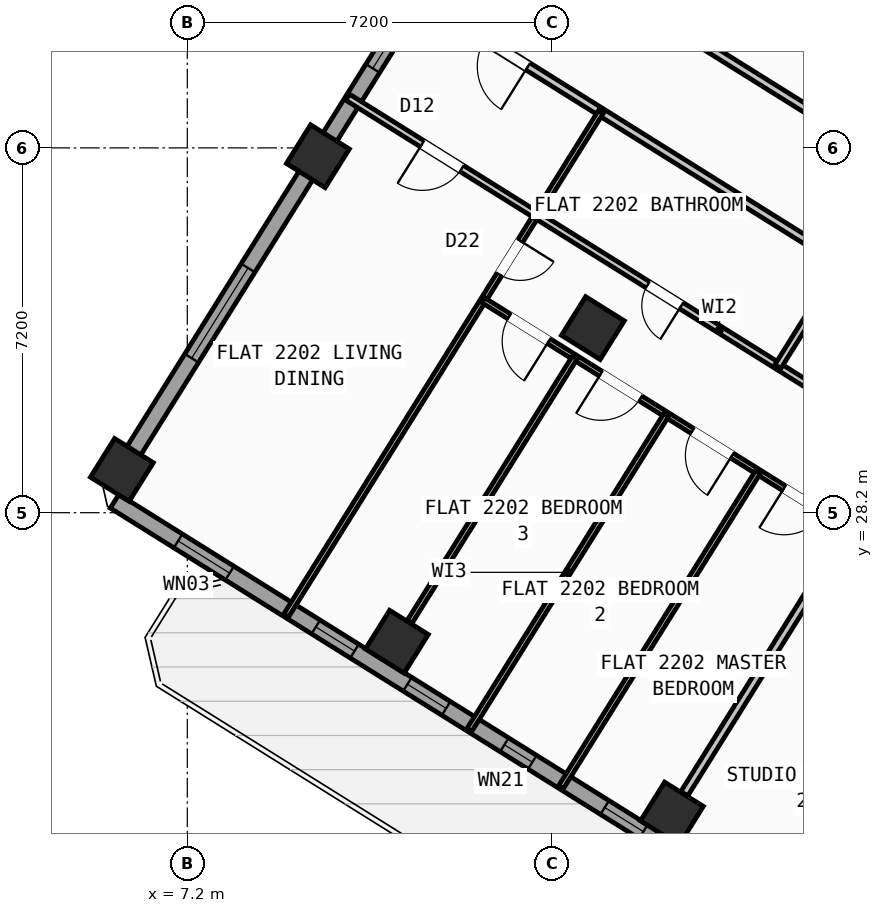
"""IFC4 building model, lengths in metres.
Left out: names, types, materials, properties, quantities, classifications, styles, units other than length and angle.
Written with IfcOpenShell. Run it as: python <this file> out.ifc"""

import sys

from ifc_helpers import new_model, si_unit, direction, frame, frame_2d, origin, origin_2d, place, context, subcontext, project, spatial, rectangle, hollow_rectangle, extrude, source, transform, mapped, element, fill, save


model = new_model("IFC4")
c1 = context("Model", 3, precision=1e-05, world=origin(), true_north=direction((0.0, 1.0)))
c2 = subcontext(c1, "Body", "Model", "MODEL_VIEW")
j1 = project(units=[si_unit("LENGTHUNIT", "METRE"), si_unit("PLANEANGLEUNIT", "RADIAN")], contexts=[c1])
p1 = place(None, origin())
s1 = spatial("IfcSite", under=j1, at=p1, CompositionType="ELEMENT")
p2 = place(p1, origin())
s2 = spatial("IfcBuilding", under=s1, at=p2, CompositionType="ELEMENT")
p3 = place(p2, frame((0.0, 0.0, 90.0)))
s3 = spatial("IfcBuildingStorey", under=s2, at=p3, CompositionType="ELEMENT", Elevation=90.0)
m1 = source(origin(), c2, "Body", "SweptSolid", [
    extrude(hollow_rectangle(XDim=0.9, YDim=0.9, WallThickness=0.036, at=origin_2d()), origin(), (0.0, 0.0, 1.0), 3.6),
])
for number, where, z_axis, x_axis in (
    (1, (16.764, 22.261, 0.0), (0.0, 0.0, 1.0), (-0.848, 0.53, 0.0)),
    (2, (15.205, 31.844, 0.0), (0.0, 0.0, 1.0), (-0.848, 0.53, 0.0)),
    (3, (11.336, 25.653, 0.0), (0.0, 0.0, 1.0), (-0.848, 0.53, 0.0)),
    (4, (9.777, 35.235, 0.0), (0.0, 0.0, 1.0), (-0.848, 0.53, 0.0)),
    (5, (5.909, 29.044, 0.0), (0.0, 0.0, 1.0), (-0.848, 0.53, 0.0)),
):
    element("IfcColumn", number, at=place(p3, frame(where, z_axis=z_axis, x_axis=x_axis)), inside=s3, PredefinedType="COLUMN", context=c2, shape_type="MappedRepresentation", body=[
        mapped(m1, transform((0.0, 0.0, 0.0), scale=1.0)),
    ])
p4 = place(p3, frame((31.76, 12.183, 0.0), z_axis=(0.0, 0.0, 1.0), x_axis=(-0.848047074256, 0.529920899612, 0.0)))
e6 = element("IfcWall", 6, at=p4, inside=s3, PredefinedType="STANDARD", context=c2, shape_type="SweptSolid", body=[
    extrude(rectangle(XDim=30.652, YDim=0.32, at=frame_2d((15.326, 0.0))), origin(), (0.0, 0.0, 1.0), 3.35),
])
p5 = place(p4, frame((15.153, 0.0, 0.0)))
e7 = element("IfcOpeningElement", 7, at=p5, cuts=e6, PredefinedType="OPENING", context=c2, shape_type="SweptSolid", body=[
    extrude(rectangle(XDim=1.2, YDim=2.15, at=frame_2d((0.6, 1.075))), frame((0.0, 0.17, 0.0), z_axis=(0.0, -1.0, 0.0), x_axis=(1.0, 0.0, 0.0)), (0.0, 0.0, 1.0), 0.34),
])
p6 = place(p4, frame((2.002, 0.0, 0.8)))
e8 = element("IfcOpeningElement", 8, at=p6, cuts=e6, PredefinedType="OPENING", context=c2, shape_type="SweptSolid", body=[
    extrude(rectangle(XDim=2.1, YDim=1.55, at=frame_2d((1.05, 0.775))), frame((0.0, 0.17, 0.0), z_axis=(0.0, -1.0, 0.0), x_axis=(1.0, 0.0, 0.0)), (0.0, 0.0, 1.0), 0.34),
])
p7 = place(p4, frame((7.206, 0.0, 0.8)))
e9 = element("IfcOpeningElement", 9, at=p7, cuts=e6, PredefinedType="OPENING", context=c2, shape_type="SweptSolid", body=[
    extrude(rectangle(XDim=2.1, YDim=1.55, at=frame_2d((1.05, 0.775))), frame((0.0, 0.17, 0.0), z_axis=(0.0, -1.0, 0.0), x_axis=(1.0, 0.0, 0.0)), (0.0, 0.0, 1.0), 0.34),
])
p8 = place(p4, frame((12.648, 0.0, 1.0)))
e10 = element("IfcOpeningElement", 10, at=p8, cuts=e6, PredefinedType="OPENING", context=c2, shape_type="SweptSolid", body=[
    extrude(rectangle(XDim=0.9, YDim=1.25, at=frame_2d((0.45, 0.625))), frame((0.0, 0.17, 0.0), z_axis=(0.0, -1.0, 0.0), x_axis=(1.0, 0.0, 0.0)), (0.0, 0.0, 1.0), 0.34),
])
p9 = place(p4, frame((27.974, 0.0, 0.95)))
e11 = element("IfcOpeningElement", 11, at=p9, cuts=e6, PredefinedType="OPENING", context=c2, shape_type="SweptSolid", body=[
    extrude(rectangle(XDim=1.2, YDim=1.4, at=frame_2d((0.6, 0.7))), frame((0.0, 0.17, 0.0), z_axis=(0.0, -1.0, 0.0), x_axis=(1.0, 0.0, 0.0)), (0.0, 0.0, 1.0), 0.34),
])
p10 = place(p4, frame((18.347, 0.0, 1.0)))
e12 = element("IfcOpeningElement", 12, at=p10, cuts=e6, PredefinedType="OPENING", context=c2, shape_type="SweptSolid", body=[
    extrude(rectangle(XDim=0.9, YDim=1.25, at=frame_2d((0.45, 0.625))), frame((0.0, 0.17, 0.0), z_axis=(0.0, -1.0, 0.0), x_axis=(1.0, 0.0, 0.0)), (0.0, 0.0, 1.0), 0.34),
])
p11 = place(p4, frame((20.931, 0.0, 1.0)))
e13 = element("IfcOpeningElement", 13, at=p11, cuts=e6, PredefinedType="OPENING", context=c2, shape_type="SweptSolid", body=[
    extrude(rectangle(XDim=0.65, YDim=1.15, at=frame_2d((0.325, 0.575))), frame((0.0, 0.17, 0.0), z_axis=(0.0, -1.0, 0.0), x_axis=(1.0, 0.0, 0.0)), (0.0, 0.0, 1.0), 0.34),
])
p12 = place(p4, frame((22.938, 0.0, 1.0)))
e14 = element("IfcOpeningElement", 14, at=p12, cuts=e6, PredefinedType="OPENING", context=c2, shape_type="SweptSolid", body=[
    extrude(rectangle(XDim=0.9, YDim=1.25, at=frame_2d((0.45, 0.625))), frame((0.0, 0.17, 0.0), z_axis=(0.0, -1.0, 0.0), x_axis=(1.0, 0.0, 0.0)), (0.0, 0.0, 1.0), 0.34),
])
p13 = place(p4, frame((25.069, 0.0, 1.0)))
e15 = element("IfcOpeningElement", 15, at=p13, cuts=e6, PredefinedType="OPENING", context=c2, shape_type="SweptSolid", body=[
    extrude(rectangle(XDim=0.9, YDim=1.25, at=frame_2d((0.45, 0.625))), frame((0.0, 0.17, 0.0), z_axis=(0.0, -1.0, 0.0), x_axis=(1.0, 0.0, 0.0)), (0.0, 0.0, 1.0), 0.34),
])
p14 = place(p3, frame((5.7, 28.71, 0.0), z_axis=(0.0, 0.0, 1.0), x_axis=(0.529923711467, 0.8480453172, 0.0)))
e16 = element("IfcWall", 16, at=p14, inside=s3, PredefinedType="STANDARD", context=c2, shape_type="SweptSolid", body=[
    extrude(rectangle(XDim=21.587, YDim=0.32, at=frame_2d((10.794, 0.0))), origin(), (0.0, 0.0, 1.0), 2.775),
])
p15 = place(p14, frame((2.994, 0.0, 0.8)))
e17 = element("IfcOpeningElement", 17, at=p15, cuts=e16, PredefinedType="OPENING", context=c2, shape_type="SweptSolid", body=[
    extrude(rectangle(XDim=2.1, YDim=1.55, at=frame_2d((1.05, 0.775))), frame((0.0, 0.17, 0.0), z_axis=(0.0, -1.0, 0.0), x_axis=(1.0, 0.0, 0.0)), (0.0, 0.0, 1.0), 0.34),
])
p16 = place(p14, frame((9.739, 0.0, 1.0)))
e18 = element("IfcOpeningElement", 18, at=p16, cuts=e16, PredefinedType="OPENING", context=c2, shape_type="SweptSolid", body=[
    extrude(rectangle(XDim=0.9, YDim=1.25, at=frame_2d((0.45, 0.625))), frame((0.0, 0.17, 0.0), z_axis=(0.0, -1.0, 0.0), x_axis=(1.0, 0.0, 0.0)), (0.0, 0.0, 1.0), 0.34),
])
p17 = place(p14, frame((18.476, 0.0, 1.0)))
e19 = element("IfcOpeningElement", 19, at=p17, cuts=e16, PredefinedType="OPENING", context=c2, shape_type="SweptSolid", body=[
    extrude(rectangle(XDim=0.9, YDim=1.25, at=frame_2d((0.45, 0.625))), frame((0.0, 0.17, 0.0), z_axis=(0.0, -1.0, 0.0), x_axis=(1.0, 0.0, 0.0)), (0.0, 0.0, 1.0), 0.34),
])
p18 = place(p3, frame((17.424, 47.083, 0.0), z_axis=(0.0, 0.0, 1.0), x_axis=(0.848049927979, -0.529916332693, 0.0)))
e20 = element("IfcWall", 20, at=p18, inside=s3, PredefinedType="STANDARD", context=c2, shape_type="SweptSolid", body=[
    extrude(rectangle(XDim=29.223, YDim=0.32, at=frame_2d((14.612, 0.0))), origin(), (0.0, 0.0, 1.0), 3.35),
])
p19 = place(p18, frame((15.02, 0.0, 0.0)))
e21 = element("IfcOpeningElement", 21, at=p19, cuts=e20, PredefinedType="OPENING", context=c2, shape_type="SweptSolid", body=[
    extrude(rectangle(XDim=1.05, YDim=2.15, at=frame_2d((0.525, 1.075))), frame((0.0, 0.17, 0.0), z_axis=(0.0, -1.0, 0.0), x_axis=(1.0, 0.0, 0.0)), (0.0, 0.0, 1.0), 0.34),
])
p20 = place(p18, frame((20.869, 0.0, 0.8)))
e22 = element("IfcOpeningElement", 22, at=p20, cuts=e20, PredefinedType="OPENING", context=c2, shape_type="SweptSolid", body=[
    extrude(rectangle(XDim=2.1, YDim=1.55, at=frame_2d((1.05, 0.775))), frame((0.0, 0.17, 0.0), z_axis=(0.0, -1.0, 0.0), x_axis=(1.0, 0.0, 0.0)), (0.0, 0.0, 1.0), 0.34),
])
p21 = place(p18, frame((25.438, 0.0, 0.8)))
e23 = element("IfcOpeningElement", 23, at=p21, cuts=e20, PredefinedType="OPENING", context=c2, shape_type="SweptSolid", body=[
    extrude(rectangle(XDim=2.1, YDim=1.55, at=frame_2d((1.05, 0.775))), frame((0.0, 0.17, 0.0), z_axis=(0.0, -1.0, 0.0), x_axis=(1.0, 0.0, 0.0)), (0.0, 0.0, 1.0), 0.34),
])
p22 = place(p18, frame((10.481, 0.0, 1.0)))
e24 = element("IfcOpeningElement", 24, at=p22, cuts=e20, PredefinedType="OPENING", context=c2, shape_type="SweptSolid", body=[
    extrude(rectangle(XDim=0.9, YDim=1.25, at=frame_2d((0.45, 0.625))), frame((0.0, 0.17, 0.0), z_axis=(0.0, -1.0, 0.0), x_axis=(1.0, 0.0, 0.0)), (0.0, 0.0, 1.0), 0.34),
])
p23 = place(p18, frame((6.674, 0.0, 1.0)))
e25 = element("IfcOpeningElement", 25, at=p23, cuts=e20, PredefinedType="OPENING", context=c2, shape_type="SweptSolid", body=[
    extrude(rectangle(XDim=0.9, YDim=1.25, at=frame_2d((0.45, 0.625))), frame((0.0, 0.17, 0.0), z_axis=(0.0, -1.0, 0.0), x_axis=(1.0, 0.0, 0.0)), (0.0, 0.0, 1.0), 0.34),
])
p24 = place(p18, frame((3.694, 0.0, 1.0)))
e26 = element("IfcOpeningElement", 26, at=p24, cuts=e20, PredefinedType="OPENING", context=c2, shape_type="SweptSolid", body=[
    extrude(rectangle(XDim=0.9, YDim=1.25, at=frame_2d((0.45, 0.625))), frame((0.0, 0.17, 0.0), z_axis=(0.0, -1.0, 0.0), x_axis=(1.0, 0.0, 0.0)), (0.0, 0.0, 1.0), 0.34),
])
p25 = place(p3, frame((26.973, 31.447, 0.0), z_axis=(0.0, 0.0, 1.0), x_axis=(-0.848048310262, 0.529918921593, 0.0)))
e27 = element("IfcWall", 27, at=p25, inside=s3, PredefinedType="PARTITIONING", context=c2, shape_type="SweptSolid", body=[
    extrude(rectangle(XDim=16.73, YDim=0.16, at=frame_2d((8.365, 0.0))), origin(), (0.0, 0.0, 1.0), 3.34),
])
p26 = place(p25, frame((2.22, 0.0, 0.0)))
e28 = element("IfcOpeningElement", 28, at=p26, cuts=e27, PredefinedType="OPENING", context=c2, shape_type="SweptSolid", body=[
    extrude(rectangle(XDim=0.86, YDim=2.05, at=frame_2d((0.43, 1.025))), frame((0.0, 0.09, 0.0), z_axis=(0.0, -1.0, 0.0), x_axis=(1.0, 0.0, 0.0)), (0.0, 0.0, 1.0), 0.18),
])
p27 = place(p25, frame((5.28, 0.0, 0.0)))
e29 = element("IfcOpeningElement", 29, at=p27, cuts=e27, PredefinedType="OPENING", context=c2, shape_type="SweptSolid", body=[
    extrude(rectangle(XDim=1.0, YDim=2.1, at=frame_2d((0.5, 1.05))), frame((0.0, 0.09, 0.0), z_axis=(0.0, -1.0, 0.0), x_axis=(1.0, 0.0, 0.0)), (0.0, 0.0, 1.0), 0.18),
])
p28 = place(p3, frame((25.807, 29.582, 0.0), z_axis=(0.0, 0.0, 1.0), x_axis=(-0.848052408131, 0.529912363569, 0.0)))
e30 = element("IfcWall", 30, at=p28, inside=s3, PredefinedType="PARTITIONING", context=c2, shape_type="SweptSolid", body=[
    extrude(rectangle(XDim=16.73, YDim=0.16, at=frame_2d((8.365, 0.0))), origin(), (0.0, 0.0, 1.0), 3.34),
])
p29 = place(p28, frame((2.22, 0.0, 0.0)))
e31 = element("IfcOpeningElement", 31, at=p29, cuts=e30, PredefinedType="OPENING", context=c2, shape_type="SweptSolid", body=[
    extrude(rectangle(XDim=0.86, YDim=2.05, at=frame_2d((0.43, 1.025))), frame((0.0, 0.09, 0.0), z_axis=(0.0, -1.0, 0.0), x_axis=(1.0, 0.0, 0.0)), (0.0, 0.0, 1.0), 0.18),
])
p30 = place(p28, frame((14.013, 0.0, 0.0)))
e32 = element("IfcOpeningElement", 32, at=p30, cuts=e30, PredefinedType="OPENING", context=c2, shape_type="SweptSolid", body=[
    extrude(rectangle(XDim=1.0, YDim=2.1, at=frame_2d((0.5, 1.05))), frame((0.0, 0.09, 0.0), z_axis=(0.0, -1.0, 0.0), x_axis=(1.0, 0.0, 0.0)), (0.0, 0.0, 1.0), 0.18),
])
p31 = place(p3, frame((20.387, 28.06, 0.0), z_axis=(0.0, 0.0, 1.0), x_axis=(-0.529902564924, -0.848058530814, 0.0)))
e33 = element("IfcWall", 33, at=p31, inside=s3, PredefinedType="PARTITIONING", context=c2, shape_type="SweptSolid", body=[
    extrude(rectangle(XDim=6.376, YDim=0.16, at=frame_2d((3.188, 0.0))), origin(), (0.0, 0.0, 1.0), 2.775),
])
p32 = place(p3, frame((15.361, 36.108, 0.0), z_axis=(0.0, 0.0, 1.0), x_axis=(-0.529912802348, -0.848052133956, 0.0)))
e34 = element("IfcWall", 34, at=p32, inside=s3, PredefinedType="PARTITIONING", context=c2, shape_type="SweptSolid", body=[
    extrude(rectangle(XDim=11.72, YDim=0.11, at=frame_2d((5.86, 0.0))), origin(), (0.0, 0.0, 1.0), 2.995),
])
p33 = place(p32, frame((3.0, 0.0, 0.0)))
e35 = element("IfcOpeningElement", 35, at=p33, cuts=e34, PredefinedType="OPENING", context=c2, shape_type="SweptSolid", body=[
    extrude(rectangle(XDim=0.78, YDim=2.05, at=frame_2d((0.39, 1.025))), frame((0.0, 0.065, 0.0), z_axis=(0.0, -1.0, 0.0), x_axis=(1.0, 0.0, 0.0)), (0.0, 0.0, 1.0), 0.13),
])
p34 = place(p3, frame((14.09, 34.073, 0.0), z_axis=(0.0, 0.0, 1.0), x_axis=(-0.848045135007, 0.529924003034, 0.0)))
e36 = element("IfcWall", 36, at=p34, inside=s3, PredefinedType="PLUMBINGWALL", context=c2, shape_type="SweptSolid", body=[
    extrude(rectangle(XDim=4.393, YDim=0.14, at=frame_2d((2.196, 0.0))), origin(), (0.0, 0.0, 1.0), 3.34),
])
p35 = place(p34, frame((1.737, 0.0, 0.0)))
e37 = element("IfcOpeningElement", 37, at=p35, cuts=e36, PredefinedType="OPENING", context=c2, shape_type="SweptSolid", body=[
    extrude(rectangle(XDim=0.92, YDim=2.08, at=frame_2d((0.46, 1.04))), frame((0.0, 0.08, 0.0), z_axis=(0.0, -1.0, 0.0), x_axis=(1.0, 0.0, 0.0)), (0.0, 0.0, 1.0), 0.16),
])
p36 = place(p3, frame((21.321, 29.554, 0.0), z_axis=(0.0, 0.0, 1.0), x_axis=(-0.84803529765, 0.529939745575, 0.0)))
e38 = element("IfcWall", 38, at=p36, inside=s3, PredefinedType="PLUMBINGWALL", context=c2, shape_type="SweptSolid", body=[
    extrude(rectangle(XDim=8.527, YDim=0.14, at=frame_2d((4.264, 0.0))), origin(), (0.0, 0.0, 1.0), 3.34),
])
p37 = place(p36, frame((5.155, 0.0, 0.0)))
e39 = element("IfcOpeningElement", 39, at=p37, cuts=e38, PredefinedType="OPENING", context=c2, shape_type="SweptSolid", body=[
    extrude(rectangle(XDim=0.78, YDim=2.05, at=frame_2d((0.39, 1.025))), frame((0.0, 0.08, 0.0), z_axis=(0.0, -1.0, 0.0), x_axis=(1.0, 0.0, 0.0)), (0.0, 0.0, 1.0), 0.16),
])
p38 = place(p36, frame((1.011, 0.0, 0.0)))
e40 = element("IfcOpeningElement", 40, at=p38, cuts=e38, PredefinedType="OPENING", context=c2, shape_type="SweptSolid", body=[
    extrude(rectangle(XDim=0.78, YDim=2.05, at=frame_2d((0.39, 1.025))), frame((0.0, 0.08, 0.0), z_axis=(0.0, -1.0, 0.0), x_axis=(1.0, 0.0, 0.0)), (0.0, 0.0, 1.0), 0.16),
])
p39 = place(p3, frame((20.132, 33.128, 0.0), z_axis=(0.0, 0.0, 1.0), x_axis=(-0.529935194983, -0.848038141311, 0.0)))
e41 = element("IfcWall", 41, at=p39, inside=s3, PredefinedType="PLUMBINGWALL", context=c2, shape_type="SweptSolid", body=[
    extrude(rectangle(XDim=2.41, YDim=0.14, at=frame_2d((1.205, 0.0))), origin(), (0.0, 0.0, 1.0), 3.34),
])
p40 = place(p3, frame((20.272, 27.875, 0.0), z_axis=(0.0, 0.0, 1.0), x_axis=(-0.848056204746, 0.529906287557, 0.0)))
e42 = element("IfcWall", 42, at=p40, inside=s3, PredefinedType="PARTITIONING", context=c2, shape_type="SweptSolid", body=[
    extrude(rectangle(XDim=8.527, YDim=0.11, at=frame_2d((4.264, 0.0))), origin(), (0.0, 0.0, 1.0), 3.34),
])
p41 = place(p40, frame((0.606, 0.0, 0.0)))
e43 = element("IfcOpeningElement", 43, at=p41, cuts=e42, PredefinedType="OPENING", context=c2, shape_type="SweptSolid", body=[
    extrude(rectangle(XDim=0.92, YDim=2.08, at=frame_2d((0.46, 1.04))), frame((0.0, 0.065, 0.0), z_axis=(0.0, -1.0, 0.0), x_axis=(1.0, 0.0, 0.0)), (0.0, 0.0, 1.0), 0.13),
])
p42 = place(p40, frame((2.738, 0.0, 0.0)))
e44 = element("IfcOpeningElement", 44, at=p42, cuts=e42, PredefinedType="OPENING", context=c2, shape_type="SweptSolid", body=[
    extrude(rectangle(XDim=0.92, YDim=2.08, at=frame_2d((0.46, 1.04))), frame((0.0, 0.065, 0.0), z_axis=(0.0, -1.0, 0.0), x_axis=(1.0, 0.0, 0.0)), (0.0, 0.0, 1.0), 0.13),
])
p43 = place(p40, frame((4.869, 0.0, 0.0)))
e45 = element("IfcOpeningElement", 45, at=p43, cuts=e42, PredefinedType="OPENING", context=c2, shape_type="SweptSolid", body=[
    extrude(rectangle(XDim=0.92, YDim=2.08, at=frame_2d((0.46, 1.04))), frame((0.0, 0.065, 0.0), z_axis=(0.0, -1.0, 0.0), x_axis=(1.0, 0.0, 0.0)), (0.0, 0.0, 1.0), 0.13),
])
p44 = place(p40, frame((7.001, 0.0, 0.0)))
e46 = element("IfcOpeningElement", 46, at=p44, cuts=e42, PredefinedType="OPENING", context=c2, shape_type="SweptSolid", body=[
    extrude(rectangle(XDim=0.92, YDim=2.08, at=frame_2d((0.46, 1.04))), frame((0.0, 0.065, 0.0), z_axis=(0.0, -1.0, 0.0), x_axis=(1.0, 0.0, 0.0)), (0.0, 0.0, 1.0), 0.13),
])
for number, where, z_axis, x_axis in (
    (47, (18.464, 29.005, 0.0), (0.0, 0.0, 1.0), (-0.53, -0.848, 0.0)),
    (48, (16.656, 30.135, 0.0), (0.0, 0.0, 1.0), (-0.53, -0.848, 0.0)),
):
    element("IfcWall", number, at=place(p3, frame(where, z_axis=z_axis, x_axis=x_axis)), inside=s3, PredefinedType="PARTITIONING", context=c2, shape_type="SweptSolid", body=[
        extrude(rectangle(XDim=7.34, YDim=0.11, at=frame_2d((3.67, 0.0))), origin(), (0.0, 0.0, 1.0), 2.995),
    ])
p45 = place(p3, frame((14.848, 31.264, 0.0), z_axis=(0.0, 0.0, 1.0), x_axis=(-0.529920534869, -0.848047302174, 0.0)))
e49 = element("IfcWall", 49, at=p45, inside=s3, PredefinedType="PARTITIONING", context=c2, shape_type="SweptSolid", body=[
    extrude(rectangle(XDim=6.158, YDim=0.11, at=frame_2d((3.079, 0.0))), origin(), (0.0, 0.0, 1.0), 2.775),
])
m2 = source(origin(), c2, "Body", "SweptSolid", [
    extrude(rectangle(XDim=1.2, YDim=1.4, at=frame_2d((0.6, 0.7))), frame((0.0, 0.03, 0.0), z_axis=(0.0, -1.0, 0.0), x_axis=(1.0, 0.0, 0.0)), (0.0, 0.0, 1.0), 0.06),
])
p46 = place(p9, origin())
e50 = element("IfcWindow", 50, at=p46, inside=s3, PartitioningType="SINGLE_PANEL", PredefinedType="WINDOW", context=c2, shape_type="MappedRepresentation", body=[
    mapped(m2, transform((0.0, 0.0, 0.0), scale=1.0)),
])
fill(e11, e50)
m3 = source(origin(), c2, "Body", "SweptSolid", [
    extrude(rectangle(XDim=2.1, YDim=1.55, at=frame_2d((1.05, 0.775))), frame((0.0, 0.03, 0.0), z_axis=(0.0, -1.0, 0.0), x_axis=(1.0, 0.0, 0.0)), (0.0, 0.0, 1.0), 0.06),
])
p47 = place(p15, origin())
e51 = element("IfcWindow", 51, at=p47, inside=s3, PartitioningType="SINGLE_PANEL", PredefinedType="WINDOW", context=c2, shape_type="MappedRepresentation", body=[
    mapped(m3, transform((0.0, 0.0, 0.0), scale=1.0)),
])
fill(e17, e51)
m4 = source(origin(), c2, "Body", "SweptSolid", [
    extrude(rectangle(XDim=0.9, YDim=1.25, at=frame_2d((0.45, 0.625))), frame((0.0, 0.03, 0.0), z_axis=(0.0, -1.0, 0.0), x_axis=(1.0, 0.0, 0.0)), (0.0, 0.0, 1.0), 0.06),
])
p48 = place(p16, origin())
e52 = element("IfcWindow", 52, at=p48, inside=s3, PartitioningType="SINGLE_PANEL", PredefinedType="WINDOW", context=c2, shape_type="MappedRepresentation", body=[
    mapped(m4, transform((0.0, 0.0, 0.0), scale=1.0)),
])
fill(e18, e52)
p49 = place(p10, origin())
e53 = element("IfcWindow", 53, at=p49, inside=s3, PartitioningType="SINGLE_PANEL", PredefinedType="WINDOW", context=c2, shape_type="MappedRepresentation", body=[
    mapped(m4, transform((0.0, 0.0, 0.0), scale=1.0)),
])
fill(e12, e53)
m5 = source(origin(), c2, "Body", "SweptSolid", [
    extrude(rectangle(XDim=0.65, YDim=1.15, at=frame_2d((0.325, 0.575))), frame((0.0, 0.03, 0.0), z_axis=(0.0, -1.0, 0.0), x_axis=(1.0, 0.0, 0.0)), (0.0, 0.0, 1.0), 0.06),
])
p50 = place(p11, origin())
e54 = element("IfcWindow", 54, at=p50, inside=s3, PartitioningType="SINGLE_PANEL", PredefinedType="WINDOW", context=c2, shape_type="MappedRepresentation", body=[
    mapped(m5, transform((0.0, 0.0, 0.0), scale=1.0)),
])
fill(e13, e54)
p51 = place(p12, origin())
e55 = element("IfcWindow", 55, at=p51, inside=s3, PartitioningType="SINGLE_PANEL", PredefinedType="WINDOW", context=c2, shape_type="MappedRepresentation", body=[
    mapped(m4, transform((0.0, 0.0, 0.0), scale=1.0)),
])
fill(e14, e55)
p52 = place(p13, origin())
e56 = element("IfcWindow", 56, at=p52, inside=s3, PartitioningType="SINGLE_PANEL", PredefinedType="WINDOW", context=c2, shape_type="MappedRepresentation", body=[
    mapped(m4, transform((0.0, 0.0, 0.0), scale=1.0)),
])
fill(e15, e56)
m6 = source(origin(), c2, "Body", "SweptSolid", [
    extrude(rectangle(XDim=1.0, YDim=2.1, at=frame_2d((0.5, 1.05))), frame((0.0, 0.025, 0.0), z_axis=(0.0, -1.0, 0.0), x_axis=(1.0, 0.0, 0.0)), (0.0, 0.0, 1.0), 0.05),
])
p53 = place(p30, origin())
e57 = element("IfcDoor", 57, at=p53, inside=s3, OperationType="SINGLE_SWING_LEFT", PredefinedType="DOOR", context=c2, shape_type="MappedRepresentation", body=[
    mapped(m6, transform((0.0, 0.0, 0.0), scale=1.0)),
])
fill(e32, e57)
m7 = source(origin(), c2, "Body", "SweptSolid", [
    extrude(rectangle(XDim=0.92, YDim=2.08, at=frame_2d((0.46, 1.04))), frame((0.0, 0.025, 0.0), z_axis=(0.0, -1.0, 0.0), x_axis=(1.0, 0.0, 0.0)), (0.0, 0.0, 1.0), 0.05),
])
p54 = place(p35, origin())
e58 = element("IfcDoor", 58, at=p54, inside=s3, OperationType="SINGLE_SWING_RIGHT", PredefinedType="DOOR", context=c2, shape_type="MappedRepresentation", body=[
    mapped(m7, transform((0.0, 0.0, 0.0), scale=1.0)),
])
fill(e37, e58)
m8 = source(origin(), c2, "Body", "SweptSolid", [
    extrude(rectangle(XDim=0.78, YDim=2.05, at=frame_2d((0.39, 1.025))), frame((0.0, 0.025, 0.0), z_axis=(0.0, -1.0, 0.0), x_axis=(1.0, 0.0, 0.0)), (0.0, 0.0, 1.0), 0.05),
])
p55 = place(p33, origin())
e59 = element("IfcDoor", 59, at=p55, inside=s3, OperationType="SINGLE_SWING_LEFT", PredefinedType="DOOR", context=c2, shape_type="MappedRepresentation", body=[
    mapped(m8, transform((0.0, 0.0, 0.0), scale=1.0)),
])
fill(e35, e59)
p56 = place(p37, origin())
e60 = element("IfcDoor", 60, at=p56, inside=s3, OperationType="SINGLE_SWING_LEFT", PredefinedType="DOOR", context=c2, shape_type="MappedRepresentation", body=[
    mapped(m8, transform((0.0, 0.0, 0.0), scale=1.0)),
])
fill(e39, e60)
p57 = place(p41, origin())
e61 = element("IfcDoor", 61, at=p57, inside=s3, OperationType="SINGLE_SWING_RIGHT", PredefinedType="DOOR", context=c2, shape_type="MappedRepresentation", body=[
    mapped(m7, transform((0.0, 0.0, 0.0), scale=1.0)),
])
fill(e43, e61)
p58 = place(p42, origin())
e62 = element("IfcDoor", 62, at=p58, inside=s3, OperationType="SINGLE_SWING_LEFT", PredefinedType="DOOR", context=c2, shape_type="MappedRepresentation", body=[
    mapped(m7, transform((0.0, 0.0, 0.0), scale=1.0)),
])
fill(e44, e62)
p59 = place(p43, origin())
e63 = element("IfcDoor", 63, at=p59, inside=s3, OperationType="SINGLE_SWING_RIGHT", PredefinedType="DOOR", context=c2, shape_type="MappedRepresentation", body=[
    mapped(m7, transform((0.0, 0.0, 0.0), scale=1.0)),
])
fill(e45, e63)
p60 = place(p44, origin())
e64 = element("IfcDoor", 64, at=p60, inside=s3, OperationType="SINGLE_SWING_LEFT", PredefinedType="DOOR", context=c2, shape_type="MappedRepresentation", body=[
    mapped(m7, transform((0.0, 0.0, 0.0), scale=1.0)),
])
fill(e46, e64)
save(model, sys.argv[1])
